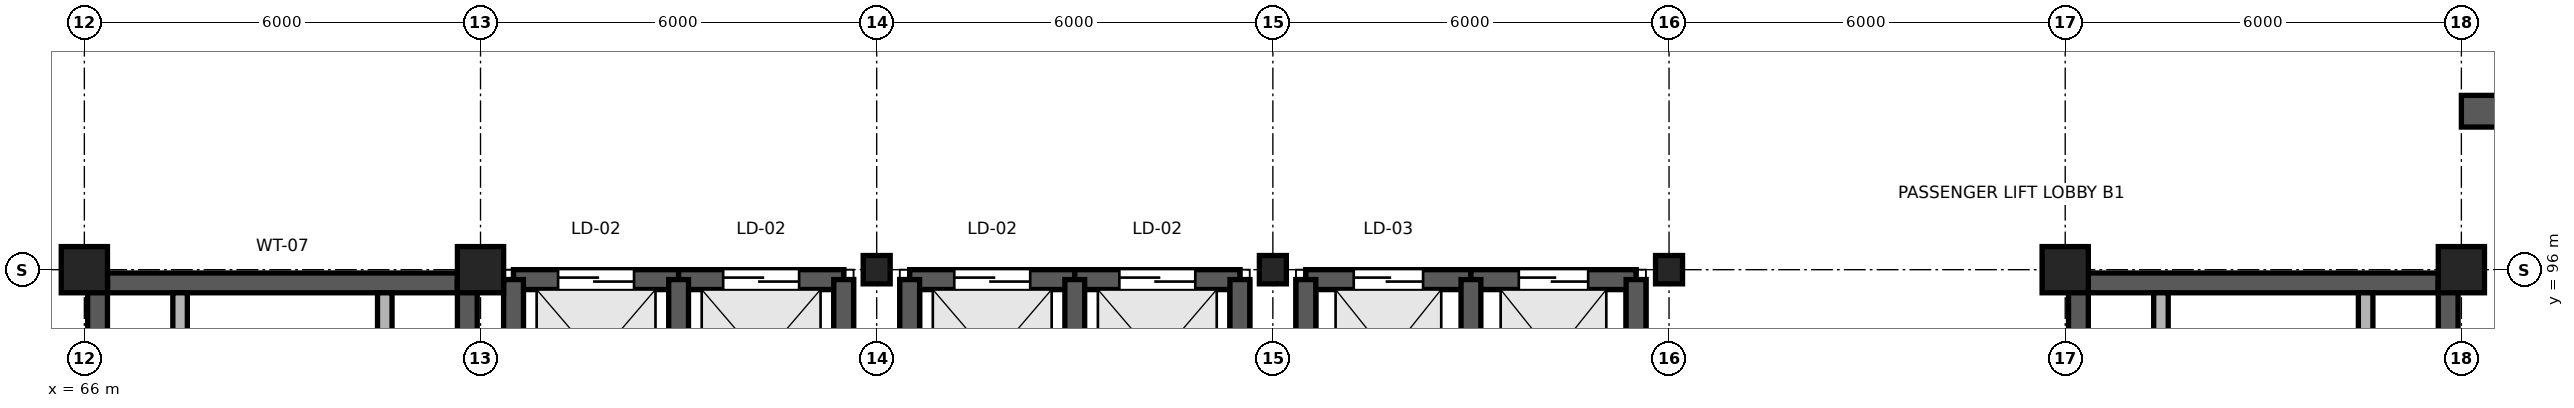
"""IFC4 building model, lengths in metres.
Left out: names, types, materials, properties, quantities, classifications, styles, units other than length and angle.
Written with IfcOpenShell. Run it as: python <this file> out.ifc"""

import sys

from ifc_helpers import new_model, si_unit, direction, frame, frame_2d, origin, origin_2d, place, context, subcontext, project, spatial, rectangle, i_section, extrude, element, fill, save


model = new_model("IFC4")
c1 = context("Model", 3, precision=1e-05, world=origin(), true_north=direction((0.0, 1.0)))
c2 = subcontext(c1, "Body", "Model", "MODEL_VIEW")
j1 = project(units=[si_unit("LENGTHUNIT", "METRE"), si_unit("PLANEANGLEUNIT", "RADIAN")], contexts=[c1])
p1 = place(None, origin())
s1 = spatial("IfcSite", under=j1, at=p1, CompositionType="ELEMENT")
p2 = place(p1, origin())
s2 = spatial("IfcBuilding", under=s1, at=p2, CompositionType="ELEMENT")
p3 = place(p2, frame((0.0, 0.0, -4.8)))
s3 = spatial("IfcBuildingStorey", under=s2, at=p3, CompositionType="ELEMENT", Elevation=-4.8)
for number, where, z_axis, x_axis in (
    (1, (66.0, 96.0, 0.0), (0.0, 0.0, 1.0), (1.0, 0.0, 0.0)),
    (2, (72.0, 96.0, 0.0), (0.0, 0.0, 1.0), (1.0, 0.0, 0.0)),
):
    element("IfcColumn", number, at=place(p3, frame(where, z_axis=z_axis, x_axis=x_axis)), inside=s3, PredefinedType="COLUMN", context=c2, shape_type="SweptSolid", body=[
        extrude(rectangle(XDim=0.7, YDim=0.7, at=origin_2d()), origin(), (0.0, 0.0, 1.0), 4.8),
    ])
for number, where, z_axis, x_axis in (
    (3, (78.0, 96.0, 0.0), (0.0, 0.0, 1.0), (1.0, 0.0, 0.0)),
    (4, (84.0, 96.0, 0.0), (0.0, 0.0, 1.0), (1.0, 0.0, 0.0)),
    (5, (90.0, 96.0, 0.0), (0.0, 0.0, 1.0), (1.0, 0.0, 0.0)),
):
    element("IfcColumn", number, at=place(p3, frame(where, z_axis=z_axis, x_axis=x_axis)), inside=s3, PredefinedType="COLUMN", context=c2, shape_type="SweptSolid", body=[
        extrude(i_section(OverallWidth=0.409, OverallDepth=0.429, WebThickness=0.024, FlangeThickness=0.035, FilletRadius=0.022, at=origin_2d()), origin(), (0.0, 0.0, 1.0), 4.8),
    ])
for number, where, z_axis, x_axis in (
    (6, (96.0, 96.0, 0.0), (0.0, 0.0, 1.0), (1.0, 0.0, 0.0)),
    (7, (102.0, 96.0, 0.0), (0.0, 0.0, 1.0), (1.0, 0.0, 0.0)),
):
    element("IfcColumn", number, at=place(p3, frame(where, z_axis=z_axis, x_axis=x_axis)), inside=s3, PredefinedType="COLUMN", context=c2, shape_type="SweptSolid", body=[
        extrude(rectangle(XDim=0.7, YDim=0.7, at=origin_2d()), origin(), (0.0, 0.0, 1.0), 4.8),
    ])
p4 = place(p3, frame((66.35, 95.8, 0.0), z_axis=(0.0, 0.0, 1.0), x_axis=(1.0, 0.0, 0.0)))
e8 = element("IfcWall", 8, at=p4, inside=s3, PredefinedType="SHEAR", context=c2, shape_type="SweptSolid", body=[
    extrude(rectangle(XDim=5.3, YDim=0.3, at=frame_2d((2.65, 0.0))), origin(), (0.0, 0.0, 1.0), 4.48),
])
for number, where, z_axis, x_axis in (
    (9, (66.2, 84.0, 0.0), (0.0, 0.0, 1.0), (0.0, 1.0, 0.0)),
    (10, (71.8, 84.0, 0.0), (0.0, 0.0, 1.0), (0.0, 1.0, 0.0)),
):
    element("IfcWall", number, at=place(p3, frame(where, z_axis=z_axis, x_axis=x_axis)), inside=s3, PredefinedType="SHEAR", context=c2, shape_type="SweptSolid", body=[
        extrude(rectangle(XDim=11.8, YDim=0.3, at=frame_2d((5.9, 0.0))), origin(), (0.0, 0.0, 1.0), 4.48),
    ])
for number, where, z_axis, x_axis in (
    (11, (67.45, 94.4, 0.0), (0.0, 0.0, 1.0), (0.0, 1.0, 0.0)),
    (12, (70.55, 94.4, 0.0), (0.0, 0.0, 1.0), (0.0, 1.0, 0.0)),
):
    element("IfcWall", number, at=place(p3, frame(where, z_axis=z_axis, x_axis=x_axis)), inside=s3, PredefinedType="PARTITIONING", context=c2, shape_type="SweptSolid", body=[
        extrude(rectangle(XDim=1.25, YDim=0.22, at=frame_2d((0.625, 0.0))), origin(), (0.0, 0.0, 1.0), 4.48),
    ])
p5 = place(p3, frame((96.35, 95.8, 0.0), z_axis=(0.0, 0.0, 1.0), x_axis=(1.0, 0.0, 0.0)))
e13 = element("IfcWall", 13, at=p5, inside=s3, PredefinedType="SHEAR", context=c2, shape_type="SweptSolid", body=[
    extrude(rectangle(XDim=5.3, YDim=0.3, at=frame_2d((2.65, 0.0))), origin(), (0.0, 0.0, 1.0), 4.48),
])
for number, where, z_axis, x_axis in (
    (14, (96.2, 84.0, 0.0), (0.0, 0.0, 1.0), (0.0, 1.0, 0.0)),
    (15, (101.8, 84.0, 0.0), (0.0, 0.0, 1.0), (0.0, 1.0, 0.0)),
):
    element("IfcWall", number, at=place(p3, frame(where, z_axis=z_axis, x_axis=x_axis)), inside=s3, PredefinedType="SHEAR", context=c2, shape_type="SweptSolid", body=[
        extrude(rectangle(XDim=11.8, YDim=0.3, at=frame_2d((5.9, 0.0))), origin(), (0.0, 0.0, 1.0), 4.48),
    ])
for number, where, z_axis, x_axis in (
    (16, (97.45, 94.4, 0.0), (0.0, 0.0, 1.0), (0.0, 1.0, 0.0)),
    (17, (100.55, 94.4, 0.0), (0.0, 0.0, 1.0), (0.0, 1.0, 0.0)),
):
    element("IfcWall", number, at=place(p3, frame(where, z_axis=z_axis, x_axis=x_axis)), inside=s3, PredefinedType="PARTITIONING", context=c2, shape_type="SweptSolid", body=[
        extrude(rectangle(XDim=1.25, YDim=0.22, at=frame_2d((0.625, 0.0))), origin(), (0.0, 0.0, 1.0), 4.48),
    ])
p6 = place(p3, frame((72.5, 95.85, -1.6), z_axis=(0.0, 0.0, 1.0), x_axis=(1.0, 0.0, 0.0)))
e18 = element("IfcWall", 18, at=p6, inside=s3, PredefinedType="SHEAR", context=c2, shape_type="SweptSolid", body=[
    extrude(rectangle(XDim=5.0, YDim=0.3, at=frame_2d((2.5, 0.0))), origin(), (0.0, 0.0, 1.0), 1.6),
])
for number, where, z_axis, x_axis in (
    (19, (72.5, 92.45, -1.6), (0.0, 0.0, 1.0), (0.0, 1.0, 0.0)),
    (20, (77.5, 92.45, -1.6), (0.0, 0.0, 1.0), (0.0, 1.0, 0.0)),
):
    element("IfcWall", number, at=place(p3, frame(where, z_axis=z_axis, x_axis=x_axis)), inside=s3, PredefinedType="SHEAR", context=c2, shape_type="SweptSolid", body=[
        extrude(rectangle(XDim=3.4, YDim=0.3, at=frame_2d((1.7, 0.0))), origin(), (0.0, 0.0, 1.0), 1.6),
    ])
p7 = place(p3, frame((78.5, 95.85, -1.6), z_axis=(0.0, 0.0, 1.0), x_axis=(1.0, 0.0, 0.0)))
e21 = element("IfcWall", 21, at=p7, inside=s3, PredefinedType="SHEAR", context=c2, shape_type="SweptSolid", body=[
    extrude(rectangle(XDim=5.0, YDim=0.3, at=frame_2d((2.5, 0.0))), origin(), (0.0, 0.0, 1.0), 1.6),
])
for number, where, z_axis, x_axis in (
    (22, (78.5, 92.45, -1.6), (0.0, 0.0, 1.0), (0.0, 1.0, 0.0)),
    (23, (83.5, 92.45, -1.6), (0.0, 0.0, 1.0), (0.0, 1.0, 0.0)),
):
    element("IfcWall", number, at=place(p3, frame(where, z_axis=z_axis, x_axis=x_axis)), inside=s3, PredefinedType="SHEAR", context=c2, shape_type="SweptSolid", body=[
        extrude(rectangle(XDim=3.4, YDim=0.3, at=frame_2d((1.7, 0.0))), origin(), (0.0, 0.0, 1.0), 1.6),
    ])
p8 = place(p3, frame((84.5, 95.85, -1.6), z_axis=(0.0, 0.0, 1.0), x_axis=(1.0, 0.0, 0.0)))
e24 = element("IfcWall", 24, at=p8, inside=s3, PredefinedType="SHEAR", context=c2, shape_type="SweptSolid", body=[
    extrude(rectangle(XDim=5.0, YDim=0.3, at=frame_2d((2.5, 0.0))), origin(), (0.0, 0.0, 1.0), 1.6),
])
for number, where, z_axis, x_axis in (
    (25, (84.5, 92.45, -1.6), (0.0, 0.0, 1.0), (0.0, 1.0, 0.0)),
    (26, (89.5, 92.45, -1.6), (0.0, 0.0, 1.0), (0.0, 1.0, 0.0)),
):
    element("IfcWall", number, at=place(p3, frame(where, z_axis=z_axis, x_axis=x_axis)), inside=s3, PredefinedType="SHEAR", context=c2, shape_type="SweptSolid", body=[
        extrude(rectangle(XDim=3.4, YDim=0.3, at=frame_2d((1.7, 0.0))), origin(), (0.0, 0.0, 1.0), 1.6),
    ])
p9 = place(p3, frame((72.5, 95.85, 0.0), z_axis=(0.0, 0.0, 1.0), x_axis=(1.0, 0.0, 0.0)))
e27 = element("IfcWall", 27, at=p9, inside=s3, PredefinedType="SHEAR", context=c2, shape_type="SweptSolid", body=[
    extrude(rectangle(XDim=2.5, YDim=0.3, at=frame_2d((1.25, 0.0))), origin(), (0.0, 0.0, 1.0), 4.48),
])
p10 = place(p9, frame((0.675, 0.0, 0.0)))
e28 = element("IfcOpeningElement", 28, at=p10, cuts=e27, PredefinedType="OPENING", context=c2, shape_type="SweptSolid", body=[
    extrude(rectangle(XDim=1.15, YDim=2.15, at=frame_2d((0.575, 1.075))), frame((0.0, 0.165, 0.0), z_axis=(0.0, -1.0, 0.0), x_axis=(1.0, 0.0, 0.0)), (0.0, 0.0, 1.0), 0.33),
])
p11 = place(p3, frame((72.5, 92.45, 0.0), z_axis=(0.0, 0.0, 1.0), x_axis=(0.0, 1.0, 0.0)))
e29 = element("IfcWall", 29, at=p11, inside=s3, PredefinedType="SHEAR", context=c2, shape_type="SweptSolid", body=[
    extrude(rectangle(XDim=3.4, YDim=0.3, at=frame_2d((1.7, 0.0))), origin(), (0.0, 0.0, 1.0), 4.48),
])
p12 = place(p3, frame((75.0, 95.85, 0.0), z_axis=(0.0, 0.0, 1.0), x_axis=(1.0, 0.0, 0.0)))
e30 = element("IfcWall", 30, at=p12, inside=s3, PredefinedType="SHEAR", context=c2, shape_type="SweptSolid", body=[
    extrude(rectangle(XDim=2.5, YDim=0.3, at=frame_2d((1.25, 0.0))), origin(), (0.0, 0.0, 1.0), 4.48),
])
p13 = place(p12, frame((0.675, 0.0, 0.0)))
e31 = element("IfcOpeningElement", 31, at=p13, cuts=e30, PredefinedType="OPENING", context=c2, shape_type="SweptSolid", body=[
    extrude(rectangle(XDim=1.15, YDim=2.15, at=frame_2d((0.575, 1.075))), frame((0.0, 0.165, 0.0), z_axis=(0.0, -1.0, 0.0), x_axis=(1.0, 0.0, 0.0)), (0.0, 0.0, 1.0), 0.33),
])
for number, where, z_axis, x_axis in (
    (32, (75.0, 92.45, 0.0), (0.0, 0.0, 1.0), (0.0, 1.0, 0.0)),
    (33, (77.5, 92.45, 0.0), (0.0, 0.0, 1.0), (0.0, 1.0, 0.0)),
):
    element("IfcWall", number, at=place(p3, frame(where, z_axis=z_axis, x_axis=x_axis)), inside=s3, PredefinedType="SHEAR", context=c2, shape_type="SweptSolid", body=[
        extrude(rectangle(XDim=3.4, YDim=0.3, at=frame_2d((1.7, 0.0))), origin(), (0.0, 0.0, 1.0), 4.48),
    ])
p14 = place(p3, frame((78.5, 95.85, 0.0), z_axis=(0.0, 0.0, 1.0), x_axis=(1.0, 0.0, 0.0)))
e34 = element("IfcWall", 34, at=p14, inside=s3, PredefinedType="SHEAR", context=c2, shape_type="SweptSolid", body=[
    extrude(rectangle(XDim=2.5, YDim=0.3, at=frame_2d((1.25, 0.0))), origin(), (0.0, 0.0, 1.0), 4.48),
])
p15 = place(p14, frame((0.675, 0.0, 0.0)))
e35 = element("IfcOpeningElement", 35, at=p15, cuts=e34, PredefinedType="OPENING", context=c2, shape_type="SweptSolid", body=[
    extrude(rectangle(XDim=1.15, YDim=2.15, at=frame_2d((0.575, 1.075))), frame((0.0, 0.165, 0.0), z_axis=(0.0, -1.0, 0.0), x_axis=(1.0, 0.0, 0.0)), (0.0, 0.0, 1.0), 0.33),
])
p16 = place(p3, frame((78.5, 92.45, 0.0), z_axis=(0.0, 0.0, 1.0), x_axis=(0.0, 1.0, 0.0)))
e36 = element("IfcWall", 36, at=p16, inside=s3, PredefinedType="SHEAR", context=c2, shape_type="SweptSolid", body=[
    extrude(rectangle(XDim=3.4, YDim=0.3, at=frame_2d((1.7, 0.0))), origin(), (0.0, 0.0, 1.0), 4.48),
])
p17 = place(p3, frame((81.0, 95.85, 0.0), z_axis=(0.0, 0.0, 1.0), x_axis=(1.0, 0.0, 0.0)))
e37 = element("IfcWall", 37, at=p17, inside=s3, PredefinedType="SHEAR", context=c2, shape_type="SweptSolid", body=[
    extrude(rectangle(XDim=2.5, YDim=0.3, at=frame_2d((1.25, 0.0))), origin(), (0.0, 0.0, 1.0), 4.48),
])
p18 = place(p17, frame((0.675, 0.0, 0.0)))
e38 = element("IfcOpeningElement", 38, at=p18, cuts=e37, PredefinedType="OPENING", context=c2, shape_type="SweptSolid", body=[
    extrude(rectangle(XDim=1.15, YDim=2.15, at=frame_2d((0.575, 1.075))), frame((0.0, 0.165, 0.0), z_axis=(0.0, -1.0, 0.0), x_axis=(1.0, 0.0, 0.0)), (0.0, 0.0, 1.0), 0.33),
])
for number, where, z_axis, x_axis in (
    (39, (81.0, 92.45, 0.0), (0.0, 0.0, 1.0), (0.0, 1.0, 0.0)),
    (40, (83.5, 92.45, 0.0), (0.0, 0.0, 1.0), (0.0, 1.0, 0.0)),
):
    element("IfcWall", number, at=place(p3, frame(where, z_axis=z_axis, x_axis=x_axis)), inside=s3, PredefinedType="SHEAR", context=c2, shape_type="SweptSolid", body=[
        extrude(rectangle(XDim=3.4, YDim=0.3, at=frame_2d((1.7, 0.0))), origin(), (0.0, 0.0, 1.0), 4.48),
    ])
p19 = place(p3, frame((84.5, 95.85, 0.0), z_axis=(0.0, 0.0, 1.0), x_axis=(1.0, 0.0, 0.0)))
e41 = element("IfcWall", 41, at=p19, inside=s3, PredefinedType="SHEAR", context=c2, shape_type="SweptSolid", body=[
    extrude(rectangle(XDim=2.5, YDim=0.3, at=frame_2d((1.25, 0.0))), origin(), (0.0, 0.0, 1.0), 4.48),
])
p20 = place(p19, frame((0.725, 0.0, 0.0)))
e42 = element("IfcOpeningElement", 42, at=p20, cuts=e41, PredefinedType="OPENING", context=c2, shape_type="SweptSolid", body=[
    extrude(rectangle(XDim=1.05, YDim=2.1, at=frame_2d((0.525, 1.05))), frame((0.0, 0.165, 0.0), z_axis=(0.0, -1.0, 0.0), x_axis=(1.0, 0.0, 0.0)), (0.0, 0.0, 1.0), 0.33),
])
p21 = place(p3, frame((84.5, 92.45, 0.0), z_axis=(0.0, 0.0, 1.0), x_axis=(0.0, 1.0, 0.0)))
e43 = element("IfcWall", 43, at=p21, inside=s3, PredefinedType="SHEAR", context=c2, shape_type="SweptSolid", body=[
    extrude(rectangle(XDim=3.4, YDim=0.3, at=frame_2d((1.7, 0.0))), origin(), (0.0, 0.0, 1.0), 4.48),
])
p22 = place(p3, frame((87.0, 95.85, 0.0), z_axis=(0.0, 0.0, 1.0), x_axis=(1.0, 0.0, 0.0)))
e44 = element("IfcWall", 44, at=p22, inside=s3, PredefinedType="SHEAR", context=c2, shape_type="SweptSolid", body=[
    extrude(rectangle(XDim=2.5, YDim=0.3, at=frame_2d((1.25, 0.0))), origin(), (0.0, 0.0, 1.0), 4.48),
])
p23 = place(p22, frame((0.725, 0.0, 0.0)))
e45 = element("IfcOpeningElement", 45, at=p23, cuts=e44, PredefinedType="OPENING", context=c2, shape_type="SweptSolid", body=[
    extrude(rectangle(XDim=1.05, YDim=2.1, at=frame_2d((0.525, 1.05))), frame((0.0, 0.165, 0.0), z_axis=(0.0, -1.0, 0.0), x_axis=(1.0, 0.0, 0.0)), (0.0, 0.0, 1.0), 0.33),
])
for number, where, z_axis, x_axis in (
    (46, (87.0, 92.45, 0.0), (0.0, 0.0, 1.0), (0.0, 1.0, 0.0)),
    (47, (89.5, 92.45, 0.0), (0.0, 0.0, 1.0), (0.0, 1.0, 0.0)),
):
    element("IfcWall", number, at=place(p3, frame(where, z_axis=z_axis, x_axis=x_axis)), inside=s3, PredefinedType="SHEAR", context=c2, shape_type="SweptSolid", body=[
        extrude(rectangle(XDim=3.4, YDim=0.3, at=frame_2d((1.7, 0.0))), origin(), (0.0, 0.0, 1.0), 4.48),
    ])
p24 = place(p3, frame((102.0, 98.4, 0.0), z_axis=(0.0, 0.0, 1.0), x_axis=(1.0, 0.0, 0.0)))
e48 = element("IfcWall", 48, at=p24, inside=s3, PredefinedType="SHEAR", context=c2, shape_type="SweptSolid", body=[
    extrude(rectangle(XDim=12.0, YDim=0.48, at=frame_2d((6.0, 0.0))), origin(), (0.0, 0.0, 1.0), 4.48),
])
p25 = place(p24, frame((5.2, 0.0, 0.0)))
e49 = element("IfcOpeningElement", 49, at=p25, cuts=e48, PredefinedType="OPENING", context=c2, shape_type="SweptSolid", body=[
    extrude(rectangle(XDim=1.6, YDim=2.25, at=frame_2d((0.8, 1.125))), frame((0.0, 0.255, 0.0), z_axis=(0.0, -1.0, 0.0), x_axis=(1.0, 0.0, 0.0)), (0.0, 0.0, 1.0), 0.51),
])
p26 = place(p10, origin())
e50 = element("IfcDoor", 50, at=p26, inside=s3, OperationType="DOUBLE_DOOR_SLIDING", PredefinedType="DOOR", context=c2, shape_type="SweptSolid", body=[
    extrude(rectangle(XDim=1.15, YDim=2.15, at=frame_2d((0.575, 1.075))), frame((0.0, 0.025, 0.0), z_axis=(0.0, -1.0, 0.0), x_axis=(1.0, 0.0, 0.0)), (0.0, 0.0, 1.0), 0.05),
])
fill(e28, e50)
p27 = place(p13, origin())
e51 = element("IfcDoor", 51, at=p27, inside=s3, OperationType="DOUBLE_DOOR_SLIDING", PredefinedType="DOOR", context=c2, shape_type="SweptSolid", body=[
    extrude(rectangle(XDim=1.15, YDim=2.15, at=frame_2d((0.575, 1.075))), frame((0.0, 0.025, 0.0), z_axis=(0.0, -1.0, 0.0), x_axis=(1.0, 0.0, 0.0)), (0.0, 0.0, 1.0), 0.05),
])
fill(e31, e51)
p28 = place(p15, origin())
e52 = element("IfcDoor", 52, at=p28, inside=s3, OperationType="DOUBLE_DOOR_SLIDING", PredefinedType="DOOR", context=c2, shape_type="SweptSolid", body=[
    extrude(rectangle(XDim=1.15, YDim=2.15, at=frame_2d((0.575, 1.075))), frame((0.0, 0.025, 0.0), z_axis=(0.0, -1.0, 0.0), x_axis=(1.0, 0.0, 0.0)), (0.0, 0.0, 1.0), 0.05),
])
fill(e35, e52)
p29 = place(p18, origin())
e53 = element("IfcDoor", 53, at=p29, inside=s3, OperationType="DOUBLE_DOOR_SLIDING", PredefinedType="DOOR", context=c2, shape_type="SweptSolid", body=[
    extrude(rectangle(XDim=1.15, YDim=2.15, at=frame_2d((0.575, 1.075))), frame((0.0, 0.025, 0.0), z_axis=(0.0, -1.0, 0.0), x_axis=(1.0, 0.0, 0.0)), (0.0, 0.0, 1.0), 0.05),
])
fill(e38, e53)
p30 = place(p20, origin())
e54 = element("IfcDoor", 54, at=p30, inside=s3, OperationType="DOUBLE_DOOR_SLIDING", PredefinedType="DOOR", context=c2, shape_type="SweptSolid", body=[
    extrude(rectangle(XDim=1.05, YDim=2.1, at=frame_2d((0.525, 1.05))), frame((0.0, 0.025, 0.0), z_axis=(0.0, -1.0, 0.0), x_axis=(1.0, 0.0, 0.0)), (0.0, 0.0, 1.0), 0.05),
])
fill(e42, e54)
p31 = place(p23, origin())
e55 = element("IfcDoor", 55, at=p31, inside=s3, OperationType="DOUBLE_DOOR_SLIDING", PredefinedType="DOOR", context=c2, shape_type="SweptSolid", body=[
    extrude(rectangle(XDim=1.05, YDim=2.1, at=frame_2d((0.525, 1.05))), frame((0.0, 0.025, 0.0), z_axis=(0.0, -1.0, 0.0), x_axis=(1.0, 0.0, 0.0)), (0.0, 0.0, 1.0), 0.05),
])
fill(e45, e55)
save(model, sys.argv[1])
